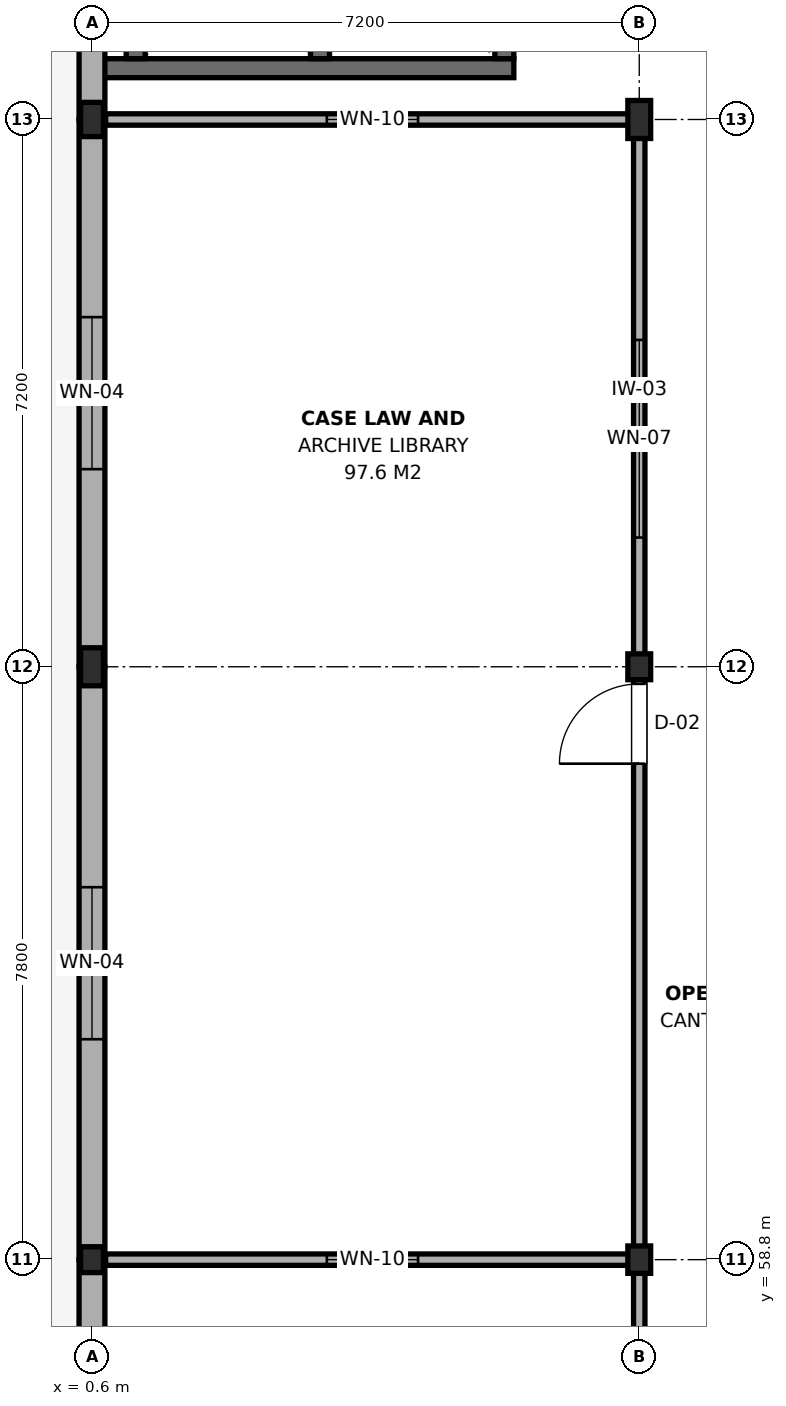
"""IFC4 building model, lengths in metres.
Left out: names, types, materials, properties, quantities, classifications, styles, units other than length and angle.
Written with IfcOpenShell. Run it as: python <this file> out.ifc"""

import sys

from ifc_helpers import new_model, si_unit, direction, frame, frame_2d, origin, origin_2d, place, context, subcontext, project, spatial, rectangle, i_section, extrude, element, fill, save


model = new_model("IFC4")
c1 = context("Model", 3, precision=1e-05, world=origin(), true_north=direction((0.0, 1.0)))
c2 = subcontext(c1, "Body", "Model", "MODEL_VIEW")
j1 = project(units=[si_unit("LENGTHUNIT", "METRE"), si_unit("PLANEANGLEUNIT", "RADIAN")], contexts=[c1])
p1 = place(None, origin())
s1 = spatial("IfcSite", under=j1, at=p1, CompositionType="ELEMENT")
p2 = place(p1, origin())
s2 = spatial("IfcBuilding", under=s1, at=p2, CompositionType="ELEMENT")
p3 = place(p2, frame((0.0, 0.0, 17.1)))
s3 = spatial("IfcBuildingStorey", under=s2, at=p3, CompositionType="ELEMENT", Elevation=17.1)
p4 = place(p3, frame((0.6, 58.8, 0.0), z_axis=(0.0, 0.0, 1.0), x_axis=(1.0, 0.0, 0.0)))
e1 = element("IfcColumn", 1, at=p4, inside=s3, PredefinedType="COLUMN", context=c2, shape_type="SweptSolid", body=[
    extrude(i_section(OverallWidth=0.3, OverallDepth=0.34, WebThickness=0.012, FlangeThickness=0.021, FilletRadius=0.027, at=origin_2d()), origin(), (0.0, 0.0, 1.0), 3.9),
])
p5 = place(p3, frame((0.6, 66.6, 0.0), z_axis=(0.0, 0.0, 1.0), x_axis=(1.0, 0.0, 0.0)))
e2 = element("IfcColumn", 2, at=p5, inside=s3, PredefinedType="COLUMN", context=c2, shape_type="SweptSolid", body=[
    extrude(i_section(OverallWidth=0.3, OverallDepth=0.5, WebThickness=0.014, FlangeThickness=0.028, FilletRadius=0.027, at=origin_2d()), origin(), (0.0, 0.0, 1.0), 3.9),
])
p6 = place(p3, frame((0.6, 73.8, 0.0), z_axis=(0.0, 0.0, 1.0), x_axis=(1.0, 0.0, 0.0)))
e3 = element("IfcColumn", 3, at=p6, inside=s3, PredefinedType="COLUMN", context=c2, shape_type="SweptSolid", body=[
    extrude(i_section(OverallWidth=0.3, OverallDepth=0.45, WebThickness=0.014, FlangeThickness=0.026, FilletRadius=0.027, at=origin_2d()), origin(), (0.0, 0.0, 1.0), 3.9),
])
p7 = place(p3, frame((7.8, 58.8, 0.0), z_axis=(0.0, 0.0, 1.0), x_axis=(1.0, 0.0, 0.0)))
e4 = element("IfcColumn", 4, at=p7, inside=s3, PredefinedType="COLUMN", context=c2, shape_type="SweptSolid", body=[
    extrude(i_section(OverallWidth=0.3, OverallDepth=0.36, WebThickness=0.012, FlangeThickness=0.022, FilletRadius=0.027, at=origin_2d()), origin(), (0.0, 0.0, 1.0), 3.9),
])
p8 = place(p3, frame((7.8, 66.6, 0.0), z_axis=(0.0, 0.0, 1.0), x_axis=(1.0, 0.0, 0.0)))
e5 = element("IfcColumn", 5, at=p8, inside=s3, PredefinedType="COLUMN", context=c2, shape_type="SweptSolid", body=[
    extrude(i_section(OverallWidth=0.3, OverallDepth=0.34, WebThickness=0.012, FlangeThickness=0.021, FilletRadius=0.027, at=origin_2d()), origin(), (0.0, 0.0, 1.0), 3.9),
])
p9 = place(p3, frame((7.8, 73.8, 0.0), z_axis=(0.0, 0.0, 1.0), x_axis=(1.0, 0.0, 0.0)))
e6 = element("IfcColumn", 6, at=p9, inside=s3, PredefinedType="COLUMN", context=c2, shape_type="SweptSolid", body=[
    extrude(i_section(OverallWidth=0.3, OverallDepth=0.5, WebThickness=0.014, FlangeThickness=0.028, FilletRadius=0.027, at=origin_2d()), origin(), (0.0, 0.0, 1.0), 3.9),
])
p10 = place(p3, frame((0.75, 74.475, 0.0), z_axis=(0.0, 0.0, 1.0), x_axis=(1.0, 0.0, 0.0)))
e7 = element("IfcWall", 7, at=p10, inside=s3, PredefinedType="SHEAR", context=c2, shape_type="SweptSolid", body=[
    extrude(rectangle(XDim=5.4, YDim=0.25, at=frame_2d((2.7, 0.0))), origin(), (0.0, 0.0, 1.0), 3.7),
])
for number, where, z_axis, x_axis in (
    (8, (1.175, 74.6, 0.0), (0.0, 0.0, 1.0), (0.0, 1.0, 0.0)),
    (9, (3.6, 74.6, 0.0), (0.0, 0.0, 1.0), (0.0, 1.0, 0.0)),
):
    element("IfcWall", number, at=place(p3, frame(where, z_axis=z_axis, x_axis=x_axis)), inside=s3, PredefinedType="SHEAR", context=c2, shape_type="SweptSolid", body=[
        extrude(rectangle(XDim=3.0, YDim=0.25, at=frame_2d((1.5, 0.0))), origin(), (0.0, 0.0, 1.0), 3.7),
    ])
p11 = place(p3, frame((6.025, 74.6, 0.0), z_axis=(0.0, 0.0, 1.0), x_axis=(0.0, 1.0, 0.0)))
e10 = element("IfcWall", 10, at=p11, inside=s3, PredefinedType="SHEAR", context=c2, shape_type="SweptSolid", body=[
    extrude(rectangle(XDim=2.4, YDim=0.25, at=frame_2d((1.2, 0.0))), origin(), (0.0, 0.0, 1.0), 3.7),
])
p12 = place(p11, frame((0.7, 0.0, 0.0)))
e11 = element("IfcOpeningElement", 11, at=p12, cuts=e10, PredefinedType="OPENING", context=c2, shape_type="SweptSolid", body=[
    extrude(rectangle(XDim=1.0, YDim=2.15, at=frame_2d((0.5, 1.075))), frame((0.0, 0.14, 0.0), z_axis=(0.0, -1.0, 0.0), x_axis=(1.0, 0.0, 0.0)), (0.0, 0.0, 1.0), 0.28),
])
p13 = place(p3, frame((0.6, 53.2, 0.0), z_axis=(0.0, 0.0, 1.0), x_axis=(0.0, 1.0, 0.0)))
e12 = element("IfcWall", 12, at=p13, inside=s3, PredefinedType="SOLIDWALL", context=c2, shape_type="SweptSolid", body=[
    extrude(rectangle(XDim=5.6, YDim=0.34, at=frame_2d((2.8, 0.0))), origin(), (0.0, 0.0, 1.0), 3.095),
])
p14 = place(p13, frame((1.8, 0.0, 0.9)))
e13 = element("IfcOpeningElement", 13, at=p14, cuts=e12, PredefinedType="OPENING", context=c2, shape_type="SweptSolid", body=[
    extrude(rectangle(XDim=2.0, YDim=1.8, at=frame_2d((1.0, 0.9))), frame((0.0, 0.185, 0.0), z_axis=(0.0, -1.0, 0.0), x_axis=(1.0, 0.0, 0.0)), (0.0, 0.0, 1.0), 0.37),
])
p15 = place(p3, frame((0.6, 58.8, 0.0), z_axis=(0.0, 0.0, 1.0), x_axis=(0.0, 1.0, 0.0)))
e14 = element("IfcWall", 14, at=p15, inside=s3, PredefinedType="SOLIDWALL", context=c2, shape_type="SweptSolid", body=[
    extrude(rectangle(XDim=7.8, YDim=0.34, at=frame_2d((3.9, 0.0))), origin(), (0.0, 0.0, 1.0), 3.095),
])
p16 = place(p15, frame((2.9, 0.0, 0.9)))
e15 = element("IfcOpeningElement", 15, at=p16, cuts=e14, PredefinedType="OPENING", context=c2, shape_type="SweptSolid", body=[
    extrude(rectangle(XDim=2.0, YDim=1.8, at=frame_2d((1.0, 0.9))), frame((0.0, 0.185, 0.0), z_axis=(0.0, -1.0, 0.0), x_axis=(1.0, 0.0, 0.0)), (0.0, 0.0, 1.0), 0.37),
])
p17 = place(p3, frame((0.6, 66.6, 0.0), z_axis=(0.0, 0.0, 1.0), x_axis=(0.0, 1.0, 0.0)))
e16 = element("IfcWall", 16, at=p17, inside=s3, PredefinedType="SOLIDWALL", context=c2, shape_type="SweptSolid", body=[
    extrude(rectangle(XDim=7.2, YDim=0.34, at=frame_2d((3.6, 0.0))), origin(), (0.0, 0.0, 1.0), 3.095),
])
p18 = place(p17, frame((2.6, 0.0, 0.9)))
e17 = element("IfcOpeningElement", 17, at=p18, cuts=e16, PredefinedType="OPENING", context=c2, shape_type="SweptSolid", body=[
    extrude(rectangle(XDim=2.0, YDim=1.8, at=frame_2d((1.0, 0.9))), frame((0.0, 0.185, 0.0), z_axis=(0.0, -1.0, 0.0), x_axis=(1.0, 0.0, 0.0)), (0.0, 0.0, 1.0), 0.37),
])
p19 = place(p3, frame((0.6, 73.8, 0.0), z_axis=(0.0, 0.0, 1.0), x_axis=(0.0, 1.0, 0.0)))
e18 = element("IfcWall", 18, at=p19, inside=s3, PredefinedType="SOLIDWALL", context=c2, shape_type="SweptSolid", body=[
    extrude(rectangle(XDim=7.2, YDim=0.34, at=frame_2d((3.6, 0.0))), origin(), (0.0, 0.0, 1.0), 3.145),
])
p20 = place(p3, frame((7.8, 40.0, 0.0), z_axis=(0.0, 0.0, 1.0), x_axis=(0.0, 1.0, 0.0)))
e19 = element("IfcWall", 19, at=p20, inside=s3, PredefinedType="PARTITIONING", context=c2, shape_type="SweptSolid", body=[
    extrude(rectangle(XDim=18.8, YDim=0.15, at=frame_2d((9.4, 0.0))), origin(), (0.0, 0.0, 1.0), 3.095),
])
p21 = place(p20, frame((8.65, 0.0, 0.0)))
e20 = element("IfcOpeningElement", 20, at=p21, cuts=e19, PredefinedType="OPENING", context=c2, shape_type="SweptSolid", body=[
    extrude(rectangle(XDim=1.5, YDim=2.15, at=frame_2d((0.75, 1.075))), frame((0.0, 0.09, 0.0), z_axis=(0.0, -1.0, 0.0), x_axis=(1.0, 0.0, 0.0)), (0.0, 0.0, 1.0), 0.18),
])
p22 = place(p20, frame((3.4, 0.0, 0.95)))
e21 = element("IfcOpeningElement", 21, at=p22, cuts=e19, PredefinedType="OPENING", context=c2, shape_type="SweptSolid", body=[
    extrude(rectangle(XDim=2.6, YDim=1.5, at=frame_2d((1.3, 0.75))), frame((0.0, 0.09, 0.0), z_axis=(0.0, -1.0, 0.0), x_axis=(1.0, 0.0, 0.0)), (0.0, 0.0, 1.0), 0.18),
])
p23 = place(p3, frame((7.8, 58.8, 0.0), z_axis=(0.0, 0.0, 1.0), x_axis=(0.0, 1.0, 0.0)))
e22 = element("IfcWall", 22, at=p23, inside=s3, PredefinedType="PARTITIONING", context=c2, shape_type="SweptSolid", body=[
    extrude(rectangle(XDim=15.0, YDim=0.15, at=frame_2d((7.5, 0.0))), origin(), (0.0, 0.0, 1.0), 3.095),
])
p24 = place(p23, frame((6.525, 0.0, 0.0)))
e23 = element("IfcOpeningElement", 23, at=p24, cuts=e22, PredefinedType="OPENING", context=c2, shape_type="SweptSolid", body=[
    extrude(rectangle(XDim=1.05, YDim=2.15, at=frame_2d((0.525, 1.075))), frame((0.0, 0.09, 0.0), z_axis=(0.0, -1.0, 0.0), x_axis=(1.0, 0.0, 0.0)), (0.0, 0.0, 1.0), 0.18),
])
p25 = place(p23, frame((9.5, 0.0, 0.95)))
e24 = element("IfcOpeningElement", 24, at=p25, cuts=e22, PredefinedType="OPENING", context=c2, shape_type="SweptSolid", body=[
    extrude(rectangle(XDim=2.6, YDim=1.5, at=frame_2d((1.3, 0.75))), frame((0.0, 0.09, 0.0), z_axis=(0.0, -1.0, 0.0), x_axis=(1.0, 0.0, 0.0)), (0.0, 0.0, 1.0), 0.18),
])
p26 = place(p3, frame((0.78, 58.8, 0.0), z_axis=(0.0, 0.0, 1.0), x_axis=(1.0, 0.0, 0.0)))
e25 = element("IfcWall", 25, at=p26, inside=s3, PredefinedType="PARTITIONING", context=c2, shape_type="SweptSolid", body=[
    extrude(rectangle(XDim=7.02, YDim=0.15, at=frame_2d((3.51, 0.0))), origin(), (0.0, 0.0, 1.0), 3.145),
])
p27 = place(p26, frame((2.91, 0.0, 0.95)))
e26 = element("IfcOpeningElement", 26, at=p27, cuts=e25, PredefinedType="OPENING", context=c2, shape_type="SweptSolid", body=[
    extrude(rectangle(XDim=1.2, YDim=1.5, at=frame_2d((0.6, 0.75))), frame((0.0, 0.09, 0.0), z_axis=(0.0, -1.0, 0.0), x_axis=(1.0, 0.0, 0.0)), (0.0, 0.0, 1.0), 0.18),
])
p28 = place(p3, frame((0.78, 73.8, 0.0), z_axis=(0.0, 0.0, 1.0), x_axis=(1.0, 0.0, 0.0)))
e27 = element("IfcWall", 27, at=p28, inside=s3, PredefinedType="PARTITIONING", context=c2, shape_type="SweptSolid", body=[
    extrude(rectangle(XDim=7.02, YDim=0.15, at=frame_2d((3.51, 0.0))), origin(), (0.0, 0.0, 1.0), 3.145),
])
p29 = place(p28, frame((2.91, 0.0, 0.95)))
e28 = element("IfcOpeningElement", 28, at=p29, cuts=e27, PredefinedType="OPENING", context=c2, shape_type="SweptSolid", body=[
    extrude(rectangle(XDim=1.2, YDim=1.5, at=frame_2d((0.6, 0.75))), frame((0.0, 0.09, 0.0), z_axis=(0.0, -1.0, 0.0), x_axis=(1.0, 0.0, 0.0)), (0.0, 0.0, 1.0), 0.18),
])
p30 = place(p16, origin())
e29 = element("IfcWindow", 29, at=p30, inside=s3, PartitioningType="SINGLE_PANEL", PredefinedType="WINDOW", context=c2, shape_type="SweptSolid", body=[
    extrude(rectangle(XDim=2.0, YDim=1.8, at=frame_2d((1.0, 0.9))), frame((0.0, 0.03, 0.0), z_axis=(0.0, -1.0, 0.0), x_axis=(1.0, 0.0, 0.0)), (0.0, 0.0, 1.0), 0.06),
])
fill(e15, e29)
p31 = place(p18, origin())
e30 = element("IfcWindow", 30, at=p31, inside=s3, PartitioningType="SINGLE_PANEL", PredefinedType="WINDOW", context=c2, shape_type="SweptSolid", body=[
    extrude(rectangle(XDim=2.0, YDim=1.8, at=frame_2d((1.0, 0.9))), frame((0.0, 0.03, 0.0), z_axis=(0.0, -1.0, 0.0), x_axis=(1.0, 0.0, 0.0)), (0.0, 0.0, 1.0), 0.06),
])
fill(e17, e30)
p32 = place(p24, origin())
e31 = element("IfcDoor", 31, at=p32, inside=s3, OperationType="SINGLE_SWING_LEFT", PredefinedType="DOOR", context=c2, shape_type="SweptSolid", body=[
    extrude(rectangle(XDim=1.05, YDim=2.15, at=frame_2d((0.525, 1.075))), frame((0.0, 0.025, 0.0), z_axis=(0.0, -1.0, 0.0), x_axis=(1.0, 0.0, 0.0)), (0.0, 0.0, 1.0), 0.05),
])
fill(e23, e31)
p33 = place(p25, origin())
e32 = element("IfcWindow", 32, at=p33, inside=s3, PartitioningType="SINGLE_PANEL", PredefinedType="WINDOW", context=c2, shape_type="SweptSolid", body=[
    extrude(rectangle(XDim=2.6, YDim=1.5, at=frame_2d((1.3, 0.75))), frame((0.0, 0.03, 0.0), z_axis=(0.0, -1.0, 0.0), x_axis=(1.0, 0.0, 0.0)), (0.0, 0.0, 1.0), 0.06),
])
fill(e24, e32)
p34 = place(p27, origin())
e33 = element("IfcWindow", 33, at=p34, inside=s3, PartitioningType="SINGLE_PANEL", PredefinedType="WINDOW", context=c2, shape_type="SweptSolid", body=[
    extrude(rectangle(XDim=1.2, YDim=1.5, at=frame_2d((0.6, 0.75))), frame((0.0, 0.03, 0.0), z_axis=(0.0, -1.0, 0.0), x_axis=(1.0, 0.0, 0.0)), (0.0, 0.0, 1.0), 0.06),
])
fill(e26, e33)
p35 = place(p29, origin())
e34 = element("IfcWindow", 34, at=p35, inside=s3, PartitioningType="SINGLE_PANEL", PredefinedType="WINDOW", context=c2, shape_type="SweptSolid", body=[
    extrude(rectangle(XDim=1.2, YDim=1.5, at=frame_2d((0.6, 0.75))), frame((0.0, 0.03, 0.0), z_axis=(0.0, -1.0, 0.0), x_axis=(1.0, 0.0, 0.0)), (0.0, 0.0, 1.0), 0.06),
])
fill(e28, e34)
save(model, sys.argv[1])
